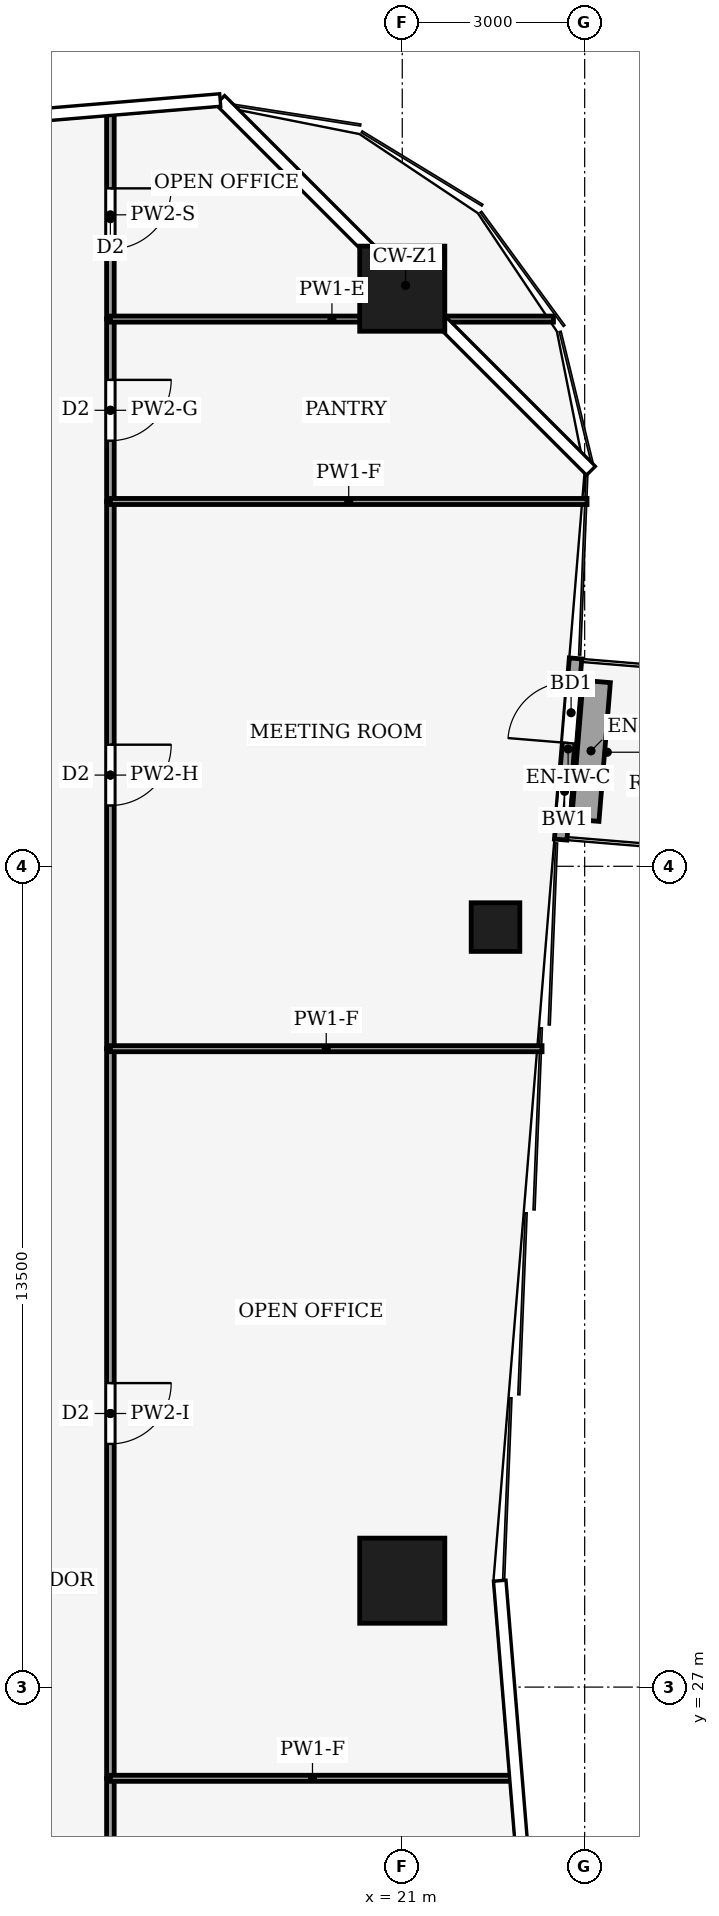
"""IFC4 building model, lengths in metres.
Left out: names, types, materials, properties, quantities, classifications, styles, units other than length and angle.
Written with IfcOpenShell. Run it as: python <this file> out.ifc"""

import sys

from ifc_helpers import new_model, si_unit, direction, frame, frame_2d, origin, origin_2d, place, context, subcontext, project, spatial, rectangle, hollow_rectangle, extrude, element, fill, save


model = new_model("IFC4")
c1 = context("Model", 3, precision=1e-05, world=origin(), true_north=direction((0.0, 1.0)))
c2 = subcontext(c1, "Body", "Model", "MODEL_VIEW")
j1 = project(units=[si_unit("LENGTHUNIT", "METRE"), si_unit("PLANEANGLEUNIT", "RADIAN")], contexts=[c1])
p1 = place(None, origin())
s1 = spatial("IfcSite", under=j1, at=p1, CompositionType="ELEMENT")
p2 = place(p1, origin())
s2 = spatial("IfcBuilding", under=s1, at=p2, CompositionType="ELEMENT")
p3 = place(p2, frame((0.0, 0.0, 74.0)))
s3 = spatial("IfcBuildingStorey", under=s2, at=p3, CompositionType="ELEMENT", Elevation=74.0)
for number, where, z_axis, x_axis in (
    (1, (21.0, 50.0, 0.0), (0.0, 0.0, 1.0), (1.0, 0.0, 0.0)),
    (2, (21.0, 28.75, 0.0), (0.0, 0.0, 1.0), (1.0, 0.0, 0.0)),
):
    element("IfcColumn", number, at=place(p3, frame(where, z_axis=z_axis, x_axis=x_axis)), inside=s3, PredefinedType="COLUMN", context=c2, shape_type="SweptSolid", body=[
        extrude(hollow_rectangle(XDim=1.4, YDim=1.4, WallThickness=0.08, at=origin_2d()), origin(), (0.0, 0.0, 1.0), 4.0),
    ])
p4 = place(p3, frame((22.534, 39.5, 0.0), z_axis=(0.0, 0.0, 1.0), x_axis=(1.0, 0.0, 0.0)))
e3 = element("IfcColumn", 3, at=p4, inside=s3, PredefinedType="COLUMN", context=c2, shape_type="SweptSolid", body=[
    extrude(hollow_rectangle(XDim=0.8, YDim=0.8, WallThickness=0.04, at=origin_2d()), origin(), (0.0, 0.0, 1.0), 4.0),
])
p5 = place(p3, frame((23.605, 40.939, 0.0), z_axis=(0.0, 0.0, 1.0), x_axis=(0.081903334605, 0.996640278024, 0.0)))
e4 = element("IfcWall", 4, at=p5, inside=s3, PredefinedType="SOLIDWALL", context=c2, shape_type="SweptSolid", body=[
    extrude(rectangle(XDim=2.99, YDim=0.206, at=frame_2d((1.495, 0.0))), origin(), (0.0, 0.0, 1.0), 3.65),
])
p6 = place(p5, frame((1.593, 0.0, 0.0)))
e5 = element("IfcOpeningElement", 5, at=p6, cuts=e4, PredefinedType="OPENING", context=c2, shape_type="SweptSolid", body=[
    extrude(rectangle(XDim=1.0, YDim=2.1, at=frame_2d((0.5, 1.05))), frame((0.0, 0.113, 0.0), z_axis=(0.0, -1.0, 0.0), x_axis=(1.0, 0.0, 0.0)), (0.0, 0.0, 1.0), 0.226),
])
p7 = place(p5, frame((0.396, 0.0, 0.9)))
e6 = element("IfcOpeningElement", 6, at=p7, cuts=e4, PredefinedType="OPENING", context=c2, shape_type="SweptSolid", body=[
    extrude(rectangle(XDim=0.8, YDim=1.2, at=frame_2d((0.4, 0.6))), frame((0.0, 0.113, 0.0), z_axis=(0.0, -1.0, 0.0), x_axis=(1.0, 0.0, 0.0)), (0.0, 0.0, 1.0), 0.226),
])
p8 = place(p3, frame((24.01, 41.257, 0.0), z_axis=(0.0, 0.0, 1.0), x_axis=(0.081986639556, 0.996633428566, 0.0)))
e7 = element("IfcWall", 7, at=p8, inside=s3, PredefinedType="USERDEFINED", context=c2, shape_type="SweptSolid", body=[
    extrude(rectangle(XDim=2.29, YDim=0.45, at=frame_2d((1.145, 0.0))), origin(), (0.0, 0.0, 1.0), 0.4),
])
p9 = place(p3, frame((16.2, 25.5, 0.0), z_axis=(0.0, 0.0, 1.0), x_axis=(0.0, -1.0, 0.0)))
e8 = element("IfcWall", 8, at=p9, inside=s3, PredefinedType="PARTITIONING", context=c2, shape_type="SweptSolid", body=[
    extrude(rectangle(XDim=3.0, YDim=0.125, at=frame_2d((1.5, 0.0))), origin(), (0.0, 0.0, 1.0), 3.48),
])
p10 = place(p9, frame((1.05, 0.0, 0.0)))
e9 = element("IfcOpeningElement", 9, at=p10, cuts=e8, PredefinedType="OPENING", context=c2, shape_type="SweptSolid", body=[
    extrude(rectangle(XDim=0.9, YDim=2.1, at=frame_2d((0.45, 1.05))), frame((0.0, 0.073, 0.0), z_axis=(0.0, -1.0, 0.0), x_axis=(1.0, 0.0, 0.0)), (0.0, 0.0, 1.0), 0.145),
])
p11 = place(p3, frame((16.2, 37.5, 0.0), z_axis=(0.0, 0.0, 1.0), x_axis=(0.0, -1.0, 0.0)))
e10 = element("IfcWall", 10, at=p11, inside=s3, PredefinedType="PARTITIONING", context=c2, shape_type="SweptSolid", body=[
    extrude(rectangle(XDim=12.0, YDim=0.125, at=frame_2d((6.0, 0.0))), origin(), (0.0, 0.0, 1.0), 3.48),
])
p12 = place(p11, frame((5.5, 0.0, 0.0)))
e11 = element("IfcOpeningElement", 11, at=p12, cuts=e10, PredefinedType="OPENING", context=c2, shape_type="SweptSolid", body=[
    extrude(rectangle(XDim=1.0, YDim=2.1, at=frame_2d((0.5, 1.05))), frame((0.0, 0.073, 0.0), z_axis=(0.0, -1.0, 0.0), x_axis=(1.0, 0.0, 0.0)), (0.0, 0.0, 1.0), 0.145),
])
p13 = place(p3, frame((16.2, 46.5, 0.0), z_axis=(0.0, 0.0, 1.0), x_axis=(0.0, -1.0, 0.0)))
e12 = element("IfcWall", 12, at=p13, inside=s3, PredefinedType="PARTITIONING", context=c2, shape_type="SweptSolid", body=[
    extrude(rectangle(XDim=9.0, YDim=0.125, at=frame_2d((4.5, 0.0))), origin(), (0.0, 0.0, 1.0), 3.14),
])
p14 = place(p13, frame((4.0, 0.0, 0.0)))
e13 = element("IfcOpeningElement", 13, at=p14, cuts=e12, PredefinedType="OPENING", context=c2, shape_type="SweptSolid", body=[
    extrude(rectangle(XDim=1.0, YDim=2.1, at=frame_2d((0.5, 1.05))), frame((0.0, 0.073, 0.0), z_axis=(0.0, -1.0, 0.0), x_axis=(1.0, 0.0, 0.0)), (0.0, 0.0, 1.0), 0.145),
])
p15 = place(p3, frame((16.2, 49.5, 0.0), z_axis=(0.0, 0.0, 1.0), x_axis=(0.0, -1.0, 0.0)))
e14 = element("IfcWall", 14, at=p15, inside=s3, PredefinedType="PARTITIONING", context=c2, shape_type="SweptSolid", body=[
    extrude(rectangle(XDim=3.0, YDim=0.125, at=frame_2d((1.5, 0.0))), origin(), (0.0, 0.0, 1.0), 3.87),
])
p16 = place(p15, frame((1.0, 0.0, 0.0)))
e15 = element("IfcOpeningElement", 15, at=p16, cuts=e14, PredefinedType="OPENING", context=c2, shape_type="SweptSolid", body=[
    extrude(rectangle(XDim=1.0, YDim=2.1, at=frame_2d((0.5, 1.05))), frame((0.0, 0.073, 0.0), z_axis=(0.0, -1.0, 0.0), x_axis=(1.0, 0.0, 0.0)), (0.0, 0.0, 1.0), 0.145),
])
p17 = place(p3, frame((16.2, 52.93, 0.0), z_axis=(0.0, 0.0, 1.0), x_axis=(0.0, -1.0, 0.0)))
e16 = element("IfcWall", 16, at=p17, inside=s3, PredefinedType="PARTITIONING", context=c2, shape_type="SweptSolid", body=[
    extrude(rectangle(XDim=3.43, YDim=0.125, at=frame_2d((1.715, 0.0))), origin(), (0.0, 0.0, 1.0), 3.04),
])
p18 = place(p17, frame((1.28, 0.0, 0.0)))
e17 = element("IfcOpeningElement", 17, at=p18, cuts=e16, PredefinedType="OPENING", context=c2, shape_type="SweptSolid", body=[
    extrude(rectangle(XDim=1.0, YDim=2.1, at=frame_2d((0.5, 1.05))), frame((0.0, 0.073, 0.0), z_axis=(0.0, -1.0, 0.0), x_axis=(1.0, 0.0, 0.0)), (0.0, 0.0, 1.0), 0.145),
])
p19 = place(p3, frame((22.847, 25.5, 0.0), z_axis=(0.0, 0.0, 1.0), x_axis=(-1.0, 0.0, 0.0)))
e18 = element("IfcWall", 18, at=p19, inside=s3, PredefinedType="PARTITIONING", context=c2, shape_type="SweptSolid", body=[
    extrude(rectangle(XDim=6.647, YDim=0.1, at=frame_2d((3.324, 0.0))), origin(), (0.0, 0.0, 1.0), 3.04),
])
p20 = place(p3, frame((23.299, 37.5, 0.0), z_axis=(0.0, 0.0, 1.0), x_axis=(-1.0, 0.0, 0.0)))
e19 = element("IfcWall", 19, at=p20, inside=s3, PredefinedType="PARTITIONING", context=c2, shape_type="SweptSolid", body=[
    extrude(rectangle(XDim=7.099, YDim=0.1, at=frame_2d((3.55, 0.0))), origin(), (0.0, 0.0, 1.0), 3.04),
])
p21 = place(p3, frame((24.039, 46.5, 0.0), z_axis=(0.0, 0.0, 1.0), x_axis=(-1.0, 0.0, 0.0)))
e20 = element("IfcWall", 20, at=p21, inside=s3, PredefinedType="PARTITIONING", context=c2, shape_type="SweptSolid", body=[
    extrude(rectangle(XDim=7.839, YDim=0.1, at=frame_2d((3.919, 0.0))), origin(), (0.0, 0.0, 1.0), 3.04),
])
p22 = place(p3, frame((23.487, 49.5, 0.0), z_axis=(0.0, 0.0, 1.0), x_axis=(-1.0, 0.0, 0.0)))
e21 = element("IfcWall", 21, at=p22, inside=s3, PredefinedType="PARTITIONING", context=c2, shape_type="SweptSolid", body=[
    extrude(rectangle(XDim=7.287, YDim=0.1, at=frame_2d((3.644, 0.0))), origin(), (0.0, 0.0, 1.0), 3.34),
])
p23 = place(p6, origin())
e22 = element("IfcDoor", 22, at=p23, inside=s3, OperationType="SINGLE_SWING_RIGHT", PredefinedType="DOOR", context=c2, shape_type="SweptSolid", body=[
    extrude(rectangle(XDim=1.0, YDim=2.1, at=frame_2d((0.5, 1.05))), frame((0.0, 0.025, 0.0), z_axis=(0.0, -1.0, 0.0), x_axis=(1.0, 0.0, 0.0)), (0.0, 0.0, 1.0), 0.05),
])
fill(e5, e22)
p24 = place(p7, origin())
e23 = element("IfcWindow", 23, at=p24, inside=s3, PartitioningType="SINGLE_PANEL", PredefinedType="WINDOW", context=c2, shape_type="SweptSolid", body=[
    extrude(rectangle(XDim=0.8, YDim=1.2, at=frame_2d((0.4, 0.6))), frame((0.0, 0.03, 0.0), z_axis=(0.0, -1.0, 0.0), x_axis=(1.0, 0.0, 0.0)), (0.0, 0.0, 1.0), 0.06),
])
fill(e6, e23)
p25 = place(p12, origin())
e24 = element("IfcDoor", 24, at=p25, inside=s3, OperationType="SINGLE_SWING_LEFT", PredefinedType="DOOR", context=c2, shape_type="SweptSolid", body=[
    extrude(rectangle(XDim=1.0, YDim=2.1, at=frame_2d((0.5, 1.05))), frame((0.0, 0.025, 0.0), z_axis=(0.0, -1.0, 0.0), x_axis=(1.0, 0.0, 0.0)), (0.0, 0.0, 1.0), 0.05),
])
fill(e11, e24)
p26 = place(p14, origin())
e25 = element("IfcDoor", 25, at=p26, inside=s3, OperationType="SINGLE_SWING_RIGHT", PredefinedType="DOOR", context=c2, shape_type="SweptSolid", body=[
    extrude(rectangle(XDim=1.0, YDim=2.1, at=frame_2d((0.5, 1.05))), frame((0.0, 0.025, 0.0), z_axis=(0.0, -1.0, 0.0), x_axis=(1.0, 0.0, 0.0)), (0.0, 0.0, 1.0), 0.05),
])
fill(e13, e25)
p27 = place(p16, origin())
e26 = element("IfcDoor", 26, at=p27, inside=s3, OperationType="SINGLE_SWING_LEFT", PredefinedType="DOOR", context=c2, shape_type="SweptSolid", body=[
    extrude(rectangle(XDim=1.0, YDim=2.1, at=frame_2d((0.5, 1.05))), frame((0.0, 0.025, 0.0), z_axis=(0.0, -1.0, 0.0), x_axis=(1.0, 0.0, 0.0)), (0.0, 0.0, 1.0), 0.05),
])
fill(e15, e26)
p28 = place(p18, origin())
e27 = element("IfcDoor", 27, at=p28, inside=s3, OperationType="SINGLE_SWING_RIGHT", PredefinedType="DOOR", context=c2, shape_type="SweptSolid", body=[
    extrude(rectangle(XDim=1.0, YDim=2.1, at=frame_2d((0.5, 1.05))), frame((0.0, 0.025, 0.0), z_axis=(0.0, -1.0, 0.0), x_axis=(1.0, 0.0, 0.0)), (0.0, 0.0, 1.0), 0.05),
])
fill(e17, e27)
save(model, sys.argv[1])
